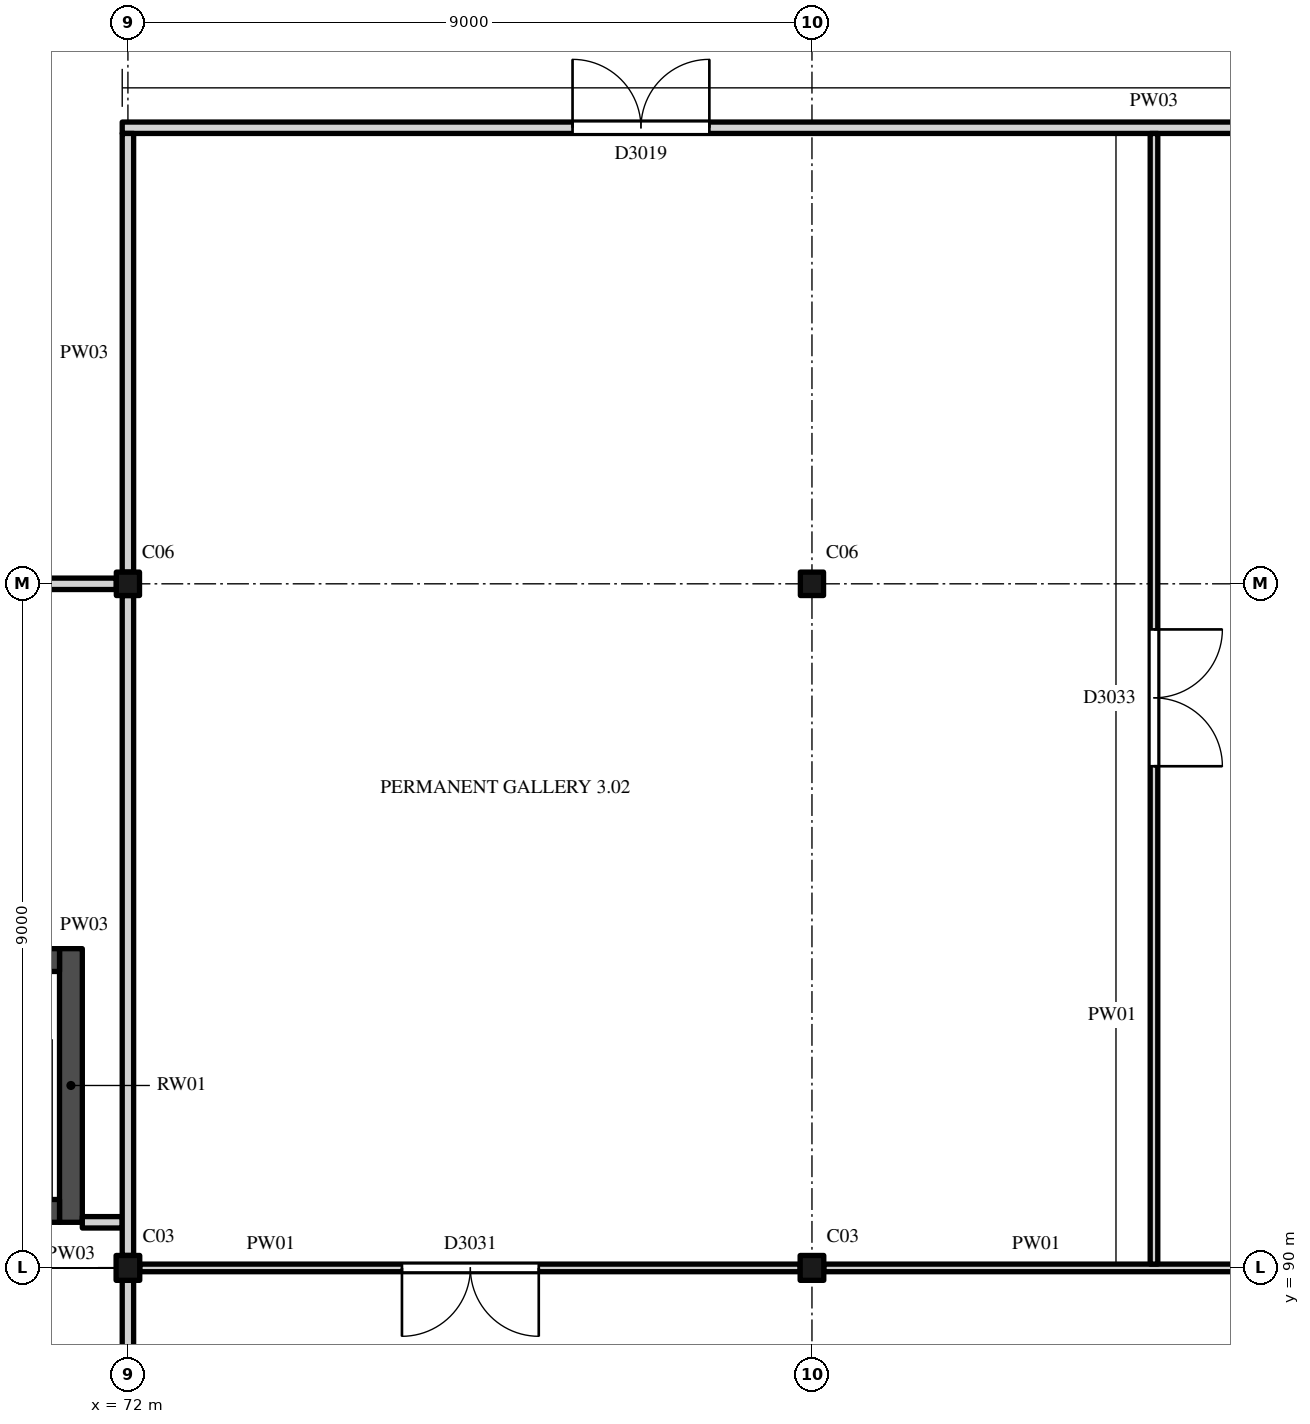
"""IFC4 building model, lengths in metres.
Left out: names, types, materials, properties, quantities, classifications, styles, units other than length and angle.
Written with IfcOpenShell. Run it as: python <this file> out.ifc"""

import sys

from ifc_helpers import new_model, si_unit, direction, frame, frame_2d, origin, origin_2d, place, context, subcontext, project, spatial, rectangle, i_section, extrude, element, fill, save


model = new_model("IFC4")
c1 = context("Model", 3, precision=1e-05, world=origin(), true_north=direction((0.0, 1.0)))
c2 = subcontext(c1, "Body", "Model", "MODEL_VIEW")
j1 = project(units=[si_unit("LENGTHUNIT", "METRE"), si_unit("PLANEANGLEUNIT", "RADIAN")], contexts=[c1])
p1 = place(None, origin())
s1 = spatial("IfcSite", under=j1, at=p1, CompositionType="ELEMENT")
p2 = place(p1, origin())
s2 = spatial("IfcBuilding", under=s1, at=p2, CompositionType="ELEMENT")
p3 = place(p2, frame((0.0, 0.0, 16.0)))
s3 = spatial("IfcBuildingStorey", under=s2, at=p3, CompositionType="ELEMENT", Elevation=16.0)
for number, where, z_axis, x_axis in (
    (1, (72.0, 90.0, 0.0), (0.0, 0.0, 1.0), (1.0, 0.0, 0.0)),
    (2, (81.0, 90.0, 0.0), (0.0, 0.0, 1.0), (1.0, 0.0, 0.0)),
):
    element("IfcColumn", number, at=place(p3, frame(where, z_axis=z_axis, x_axis=x_axis)), inside=s3, PredefinedType="COLUMN", context=c2, shape_type="SweptSolid", body=[
        extrude(i_section(OverallWidth=0.311, OverallDepth=0.327, WebThickness=0.016, FlangeThickness=0.025, FilletRadius=0.017, at=origin_2d()), origin(), (0.0, 0.0, 1.0), 10.0),
    ])
for number, where, z_axis, x_axis in (
    (3, (72.0, 99.0, 0.0), (0.0, 0.0, 1.0), (1.0, 0.0, 0.0)),
    (4, (81.0, 99.0, 0.0), (0.0, 0.0, 1.0), (1.0, 0.0, 0.0)),
):
    element("IfcColumn", number, at=place(p3, frame(where, z_axis=z_axis, x_axis=x_axis)), inside=s3, PredefinedType="COLUMN", context=c2, shape_type="SweptSolid", body=[
        extrude(i_section(OverallWidth=0.305, OverallDepth=0.308, WebThickness=0.01, FlangeThickness=0.015, FilletRadius=0.017, at=origin_2d()), origin(), (0.0, 0.0, 1.0), 10.0),
    ])
p4 = place(p3, frame((71.25, 90.6, 0.0), z_axis=(0.0, 0.0, 1.0), x_axis=(0.0, 1.0, 0.0)))
e5 = element("IfcWall", 5, at=p4, inside=s3, PredefinedType="SHEAR", context=c2, shape_type="SweptSolid", body=[
    extrude(rectangle(XDim=3.6, YDim=0.3, at=frame_2d((1.8, 0.0))), origin(), (0.0, 0.0, 1.0), 10.0),
])
p5 = place(p3, frame((68.95, 90.75, 0.0), z_axis=(0.0, 0.0, 1.0), x_axis=(1.0, 0.0, 0.0)))
e6 = element("IfcWall", 6, at=p5, inside=s3, PredefinedType="SHEAR", context=c2, shape_type="SweptSolid", body=[
    extrude(rectangle(XDim=2.15, YDim=0.3, at=frame_2d((1.075, 0.0))), origin(), (0.0, 0.0, 1.0), 10.0),
])
p6 = place(p5, frame((0.6, 0.0, 0.0)))
e7 = element("IfcOpeningElement", 7, at=p6, cuts=e6, PredefinedType="OPENING", context=c2, shape_type="SweptSolid", body=[
    extrude(rectangle(XDim=1.1, YDim=2.1, at=frame_2d((0.55, 1.05))), frame((0.0, 0.16, 0.0), z_axis=(0.0, -1.0, 0.0), x_axis=(1.0, 0.0, 0.0)), (0.0, 0.0, 1.0), 0.32),
])
p7 = place(p3, frame((68.95, 94.05, 0.0), z_axis=(0.0, 0.0, 1.0), x_axis=(1.0, 0.0, 0.0)))
e8 = element("IfcWall", 8, at=p7, inside=s3, PredefinedType="SHEAR", context=c2, shape_type="SweptSolid", body=[
    extrude(rectangle(XDim=2.15, YDim=0.3, at=frame_2d((1.075, 0.0))), origin(), (0.0, 0.0, 1.0), 10.0),
])
p8 = place(p3, frame((72.156, 90.0, 0.0), z_axis=(0.0, 0.0, 1.0), x_axis=(1.0, 0.0, 0.0)))
e9 = element("IfcWall", 9, at=p8, inside=s3, PredefinedType="PARTITIONING", context=c2, shape_type="SweptSolid", body=[
    extrude(rectangle(XDim=8.689, YDim=0.1, at=frame_2d((4.344, 0.0))), origin(), (0.0, 0.0, 1.0), 9.473),
])
p9 = place(p8, frame((3.45, 0.0, 0.0)))
e10 = element("IfcOpeningElement", 10, at=p9, cuts=e9, PredefinedType="OPENING", context=c2, shape_type="SweptSolid", body=[
    extrude(rectangle(XDim=1.8, YDim=2.4, at=frame_2d((0.9, 1.2))), frame((0.0, 0.06, 0.0), z_axis=(0.0, -1.0, 0.0), x_axis=(1.0, 0.0, 0.0)), (0.0, 0.0, 1.0), 0.12),
])
p10 = place(p3, frame((81.156, 90.0, 0.0), z_axis=(0.0, 0.0, 1.0), x_axis=(1.0, 0.0, 0.0)))
e11 = element("IfcWall", 11, at=p10, inside=s3, PredefinedType="PARTITIONING", context=c2, shape_type="SweptSolid", body=[
    extrude(rectangle(XDim=8.689, YDim=0.1, at=frame_2d((4.344, 0.0))), origin(), (0.0, 0.0, 1.0), 9.473),
])
p11 = place(p10, frame((5.594, 0.0, 0.0)))
e12 = element("IfcOpeningElement", 12, at=p11, cuts=e11, PredefinedType="OPENING", context=c2, shape_type="SweptSolid", body=[
    extrude(rectangle(XDim=1.8, YDim=2.4, at=frame_2d((0.9, 1.2))), frame((0.0, 0.06, 0.0), z_axis=(0.0, -1.0, 0.0), x_axis=(1.0, 0.0, 0.0)), (0.0, 0.0, 1.0), 0.12),
])
p12 = place(p3, frame((71.4, 90.6, 0.0), z_axis=(0.0, 0.0, 1.0), x_axis=(1.0, 0.0, 0.0)))
e13 = element("IfcWall", 13, at=p12, inside=s3, PredefinedType="PARTITIONING", context=c2, shape_type="SweptSolid", body=[
    extrude(rectangle(XDim=0.525, YDim=0.15, at=frame_2d((0.263, 0.0))), origin(), (0.0, 0.0, 1.0), 9.825),
])
p13 = place(p3, frame((63.153, 99.0, 0.0), z_axis=(0.0, 0.0, 1.0), x_axis=(1.0, 0.0, 0.0)))
e14 = element("IfcWall", 14, at=p13, inside=s3, PredefinedType="PARTITIONING", context=c2, shape_type="SweptSolid", body=[
    extrude(rectangle(XDim=8.695, YDim=0.15, at=frame_2d((4.347, 0.0))), origin(), (0.0, 0.0, 1.0), 9.473),
])
p14 = place(p13, frame((3.85, 0.0, 0.0)))
e15 = element("IfcOpeningElement", 15, at=p14, cuts=e14, PredefinedType="OPENING", context=c2, shape_type="SweptSolid", body=[
    extrude(rectangle(XDim=1.0, YDim=2.4, at=frame_2d((0.5, 1.2))), frame((0.0, 0.085, 0.0), z_axis=(0.0, -1.0, 0.0), x_axis=(1.0, 0.0, 0.0)), (0.0, 0.0, 1.0), 0.17),
])
p15 = place(p3, frame((71.925, 105.0, 0.0), z_axis=(0.0, 0.0, 1.0), x_axis=(1.0, 0.0, 0.0)))
e16 = element("IfcWall", 16, at=p15, inside=s3, PredefinedType="PARTITIONING", context=c2, shape_type="SweptSolid", body=[
    extrude(rectangle(XDim=27.15, YDim=0.15, at=frame_2d((13.575, 0.0))), origin(), (0.0, 0.0, 1.0), 9.521),
])
p16 = place(p15, frame((5.925, 0.0, 0.0)))
e17 = element("IfcOpeningElement", 17, at=p16, cuts=e16, PredefinedType="OPENING", context=c2, shape_type="SweptSolid", body=[
    extrude(rectangle(XDim=1.8, YDim=2.4, at=frame_2d((0.9, 1.2))), frame((0.0, 0.085, 0.0), z_axis=(0.0, -1.0, 0.0), x_axis=(1.0, 0.0, 0.0)), (0.0, 0.0, 1.0), 0.17),
])
p17 = place(p15, frame((19.425, 0.0, 0.0)))
e18 = element("IfcOpeningElement", 18, at=p17, cuts=e16, PredefinedType="OPENING", context=c2, shape_type="SweptSolid", body=[
    extrude(rectangle(XDim=1.8, YDim=2.4, at=frame_2d((0.9, 1.2))), frame((0.0, 0.085, 0.0), z_axis=(0.0, -1.0, 0.0), x_axis=(1.0, 0.0, 0.0)), (0.0, 0.0, 1.0), 0.17),
])
p18 = place(p3, frame((72.0, 84.075, 0.0), z_axis=(0.0, 0.0, 1.0), x_axis=(0.0, 1.0, 0.0)))
e19 = element("IfcWall", 19, at=p18, inside=s3, PredefinedType="PARTITIONING", context=c2, shape_type="SweptSolid", body=[
    extrude(rectangle(XDim=5.761, YDim=0.15, at=frame_2d((2.881, 0.0))), origin(), (0.0, 0.0, 1.0), 9.371),
])
p19 = place(p3, frame((72.0, 90.164, 0.0), z_axis=(0.0, 0.0, 1.0), x_axis=(0.0, 1.0, 0.0)))
e20 = element("IfcWall", 20, at=p19, inside=s3, PredefinedType="PARTITIONING", context=c2, shape_type="SweptSolid", body=[
    extrude(rectangle(XDim=8.682, YDim=0.15, at=frame_2d((4.341, 0.0))), origin(), (0.0, 0.0, 1.0), 9.371),
])
p20 = place(p3, frame((72.0, 99.154, 0.0), z_axis=(0.0, 0.0, 1.0), x_axis=(0.0, 1.0, 0.0)))
e21 = element("IfcWall", 21, at=p20, inside=s3, PredefinedType="PARTITIONING", context=c2, shape_type="SweptSolid", body=[
    extrude(rectangle(XDim=5.771, YDim=0.15, at=frame_2d((2.885, 0.0))), origin(), (0.0, 0.0, 1.0), 9.371),
])
p21 = place(p3, frame((85.5, 90.05, 0.0), z_axis=(0.0, 0.0, 1.0), x_axis=(0.0, 1.0, 0.0)))
e22 = element("IfcWall", 22, at=p21, inside=s3, PredefinedType="PARTITIONING", context=c2, shape_type="SweptSolid", body=[
    extrude(rectangle(XDim=14.875, YDim=0.1, at=frame_2d((7.438, 0.0))), origin(), (0.0, 0.0, 1.0), 9.825),
])
p22 = place(p21, frame((6.55, 0.0, 0.0)))
e23 = element("IfcOpeningElement", 23, at=p22, cuts=e22, PredefinedType="OPENING", context=c2, shape_type="SweptSolid", body=[
    extrude(rectangle(XDim=1.8, YDim=2.4, at=frame_2d((0.9, 1.2))), frame((0.0, 0.06, 0.0), z_axis=(0.0, -1.0, 0.0), x_axis=(1.0, 0.0, 0.0)), (0.0, 0.0, 1.0), 0.12),
])
p23 = place(p16, origin())
e24 = element("IfcDoor", 24, at=p23, inside=s3, OperationType="DOUBLE_DOOR_SINGLE_SWING", PredefinedType="DOOR", context=c2, shape_type="SweptSolid", body=[
    extrude(rectangle(XDim=1.8, YDim=2.4, at=frame_2d((0.9, 1.2))), frame((0.0, 0.025, 0.0), z_axis=(0.0, -1.0, 0.0), x_axis=(1.0, 0.0, 0.0)), (0.0, 0.0, 1.0), 0.05),
])
fill(e17, e24)
p24 = place(p9, origin())
e25 = element("IfcDoor", 25, at=p24, inside=s3, OperationType="DOUBLE_DOOR_SINGLE_SWING", PredefinedType="DOOR", context=c2, shape_type="SweptSolid", body=[
    extrude(rectangle(XDim=1.8, YDim=2.4, at=frame_2d((0.9, 1.2))), frame((0.0, 0.025, 0.0), z_axis=(0.0, -1.0, 0.0), x_axis=(1.0, 0.0, 0.0)), (0.0, 0.0, 1.0), 0.05),
])
fill(e10, e25)
p25 = place(p22, origin())
e26 = element("IfcDoor", 26, at=p25, inside=s3, OperationType="DOUBLE_DOOR_SINGLE_SWING", PredefinedType="DOOR", context=c2, shape_type="SweptSolid", body=[
    extrude(rectangle(XDim=1.8, YDim=2.4, at=frame_2d((0.9, 1.2))), frame((0.0, 0.025, 0.0), z_axis=(0.0, -1.0, 0.0), x_axis=(1.0, 0.0, 0.0)), (0.0, 0.0, 1.0), 0.05),
])
fill(e23, e26)
save(model, sys.argv[1])
